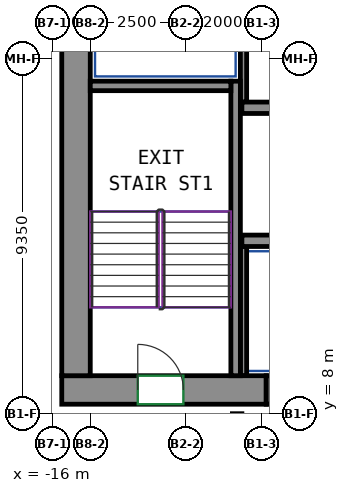
"""IFC4 building model, lengths in metres.
Left out: names, types, materials, properties, quantities, classifications, styles, units other than length and angle.
Written with IfcOpenShell. Run it as: python <this file> out.ifc"""

import sys

from ifc_helpers import new_model, si_unit, direction, frame, frame_2d, origin, place, context, subcontext, project, spatial, rectangle, extrude, source, transform, mapped, element, fill, save


model = new_model("IFC4")
c1 = context("Model", 3, precision=1e-05, world=origin(), true_north=direction((0.0, 1.0)))
c2 = subcontext(c1, "Body", "Model", "MODEL_VIEW")
j1 = project(units=[si_unit("LENGTHUNIT", "METRE"), si_unit("PLANEANGLEUNIT", "RADIAN")], contexts=[c1])
p1 = place(None, origin())
s1 = spatial("IfcSite", under=j1, at=p1, CompositionType="ELEMENT")
p2 = place(p1, origin())
s2 = spatial("IfcBuilding", under=s1, at=p2, CompositionType="ELEMENT")
p3 = place(p2, frame((0.0, 0.0, 199.9)))
s3 = spatial("IfcBuildingStorey", under=s2, at=p3, CompositionType="ELEMENT", Elevation=199.9)
m1 = source(origin(), c2, "Body", "SweptSolid", [
    extrude(rectangle(XDim=5.38, YDim=0.75, at=frame_2d((2.69, 0.0))), origin(), (0.0, 0.0, 1.0), 3.12),
])
p4 = place(p3, frame((-15.75, 8.625, 0.0), z_axis=(0.0, 0.0, 1.0), x_axis=(1.0, 0.0, 0.0)))
e1 = element("IfcWall", 1, at=p4, inside=s3, PredefinedType="SHEAR", context=c2, shape_type="MappedRepresentation", body=[
    mapped(m1, transform((0.0, 0.0, 0.0))),
])
p5 = place(p4, frame((2.0, 0.0, 0.0)))
e2 = element("IfcOpeningElement", 2, at=p5, cuts=e1, PredefinedType="OPENING", context=c2, shape_type="SweptSolid", body=[
    extrude(rectangle(XDim=1.2, YDim=2.1, at=frame_2d((0.6, 1.05))), frame((0.0, 0.385, 0.0), z_axis=(0.0, -1.0, 0.0), x_axis=(1.0, 0.0, 0.0)), (0.0, 0.0, 1.0), 0.77),
])
m2 = source(origin(), c2, "Body", "SweptSolid", [
    extrude(rectangle(XDim=12.0, YDim=0.75, at=frame_2d((6.0, 0.0))), origin(), (0.0, 0.0, 1.0), 3.12),
])
p6 = place(p3, frame((-15.375, 9.0, 0.0), z_axis=(0.0, 0.0, 1.0), x_axis=(0.0, 1.0, 0.0)))
e3 = element("IfcWall", 3, at=p6, inside=s3, PredefinedType="SHEAR", context=c2, shape_type="MappedRepresentation", body=[
    mapped(m2, transform((0.0, 0.0, 0.0))),
])
m3 = source(origin(), c2, "Body", "SweptSolid", [
    extrude(rectangle(XDim=7.75, YDim=0.25, at=frame_2d((3.875, 0.0))), origin(), (0.0, 0.0, 1.0), 3.12),
])
p7 = place(p3, frame((-11.175, 9.0, 0.0), z_axis=(0.0, 0.0, 1.0), x_axis=(0.0, 1.0, 0.0)))
e4 = element("IfcWall", 4, at=p7, inside=s3, PredefinedType="SHEAR", context=c2, shape_type="MappedRepresentation", body=[
    mapped(m3, transform((0.0, 0.0, 0.0))),
])
m4 = source(origin(), c2, "Body", "SweptSolid", [
    extrude(rectangle(XDim=3.7, YDim=0.25, at=frame_2d((1.85, 0.0))), origin(), (0.0, 0.0, 1.0), 3.12),
])
p8 = place(p3, frame((-15.0, 16.625, 0.0), z_axis=(0.0, 0.0, 1.0), x_axis=(1.0, 0.0, 0.0)))
e5 = element("IfcWall", 5, at=p8, inside=s3, PredefinedType="SHEAR", context=c2, shape_type="MappedRepresentation", body=[
    mapped(m4, transform((0.0, 0.0, 0.0))),
])
m5 = source(origin(), c2, "Body", "SweptSolid", [
    extrude(rectangle(XDim=6.0, YDim=0.3, at=frame_2d((3.0, 0.0))), origin(), (0.0, 0.0, 1.0), 3.12),
])
p9 = place(p3, frame((-11.01, 12.55, 0.0), z_axis=(0.0, 0.0, 1.0), x_axis=(1.0, 0.0, 0.0)))
e6 = element("IfcWall", 6, at=p9, inside=s3, PredefinedType="SHEAR", context=c2, shape_type="MappedRepresentation", body=[
    mapped(m5, transform((0.0, 0.0, 0.0))),
])
m6 = source(origin(), c2, "Body", "SweptSolid", [
    extrude(rectangle(XDim=14.04, YDim=0.3, at=frame_2d((7.02, 0.0))), origin(), (0.0, 0.0, 1.0), 3.12),
])
p10 = place(p3, frame((-11.01, 16.05, 0.0), z_axis=(0.0, 0.0, 1.0), x_axis=(1.0, 0.0, 0.0)))
e7 = element("IfcWall", 7, at=p10, inside=s3, PredefinedType="SHEAR", context=c2, shape_type="MappedRepresentation", body=[
    mapped(m6, transform((0.0, 0.0, 0.0))),
])
m7 = source(origin(), c2, "Body", "SweptSolid", [
    extrude(rectangle(XDim=4.8, YDim=0.165, at=frame_2d((2.4, 0.0))), origin(), (0.0, 0.0, 1.0), 3.12),
])
p11 = place(p3, frame((-10.968, 16.2, 0.0), z_axis=(0.0, 0.0, 1.0), x_axis=(0.0, 1.0, 0.0)))
e8 = element("IfcWall", 8, at=p11, inside=s3, PredefinedType="PARTITIONING", context=c2, shape_type="MappedRepresentation", body=[
    mapped(m7, transform((0.0, 0.0, 0.0))),
])
m8 = source(origin(), c2, "Body", "SweptSolid", [
    extrude(rectangle(XDim=3.4, YDim=0.165, at=frame_2d((1.7, 0.0))), origin(), (0.0, 0.0, 1.0), 3.12),
])
p12 = place(p3, frame((-10.968, 9.0, 0.0), z_axis=(0.0, 0.0, 1.0), x_axis=(0.0, 1.0, 0.0)))
e9 = element("IfcWall", 9, at=p12, inside=s3, PredefinedType="PARTITIONING", context=c2, shape_type="MappedRepresentation", body=[
    mapped(m8, transform((0.0, 0.0, 0.0))),
])
m9 = source(origin(), c2, "Body", "SweptSolid", [
    extrude(rectangle(XDim=1.4, YDim=0.75, at=frame_2d((0.7, 0.0))), origin(), (0.0, 0.0, 1.0), 2.7),
])
p13 = place(p3, frame((-10.37, 8.625, 0.0), z_axis=(0.0, 0.0, 1.0), x_axis=(1.0, 0.0, 0.0)))
e10 = element("IfcWall", 10, at=p13, inside=s3, PredefinedType="PARTITIONING", context=c2, shape_type="MappedRepresentation", body=[
    mapped(m9, transform((0.0, 0.0, 0.0))),
])
p14 = place(p13, frame((0.25, 0.0, 0.0)))
e11 = element("IfcOpeningElement", 11, at=p14, cuts=e10, PredefinedType="OPENING", context=c2, shape_type="SweptSolid", body=[
    extrude(rectangle(XDim=0.9, YDim=2.1, at=frame_2d((0.45, 1.05))), frame((0.0, 0.385, 0.0), z_axis=(0.0, -1.0, 0.0), x_axis=(1.0, 0.0, 0.0)), (0.0, 0.0, 1.0), 0.77),
])
p15 = place(p5, origin())
e12 = element("IfcDoor", 12, at=p15, inside=s3, OperationType="DOUBLE_DOOR_SINGLE_SWING", PredefinedType="DOOR", context=c2, shape_type="SweptSolid", body=[
    extrude(rectangle(XDim=1.2, YDim=2.1, at=frame_2d((0.6, 1.05))), frame((0.0, 0.28, 0.0), z_axis=(0.0, -1.0, 0.0), x_axis=(1.0, 0.0, 0.0)), (0.0, 0.0, 1.0), 0.05),
])
fill(e2, e12)
save(model, sys.argv[1])
